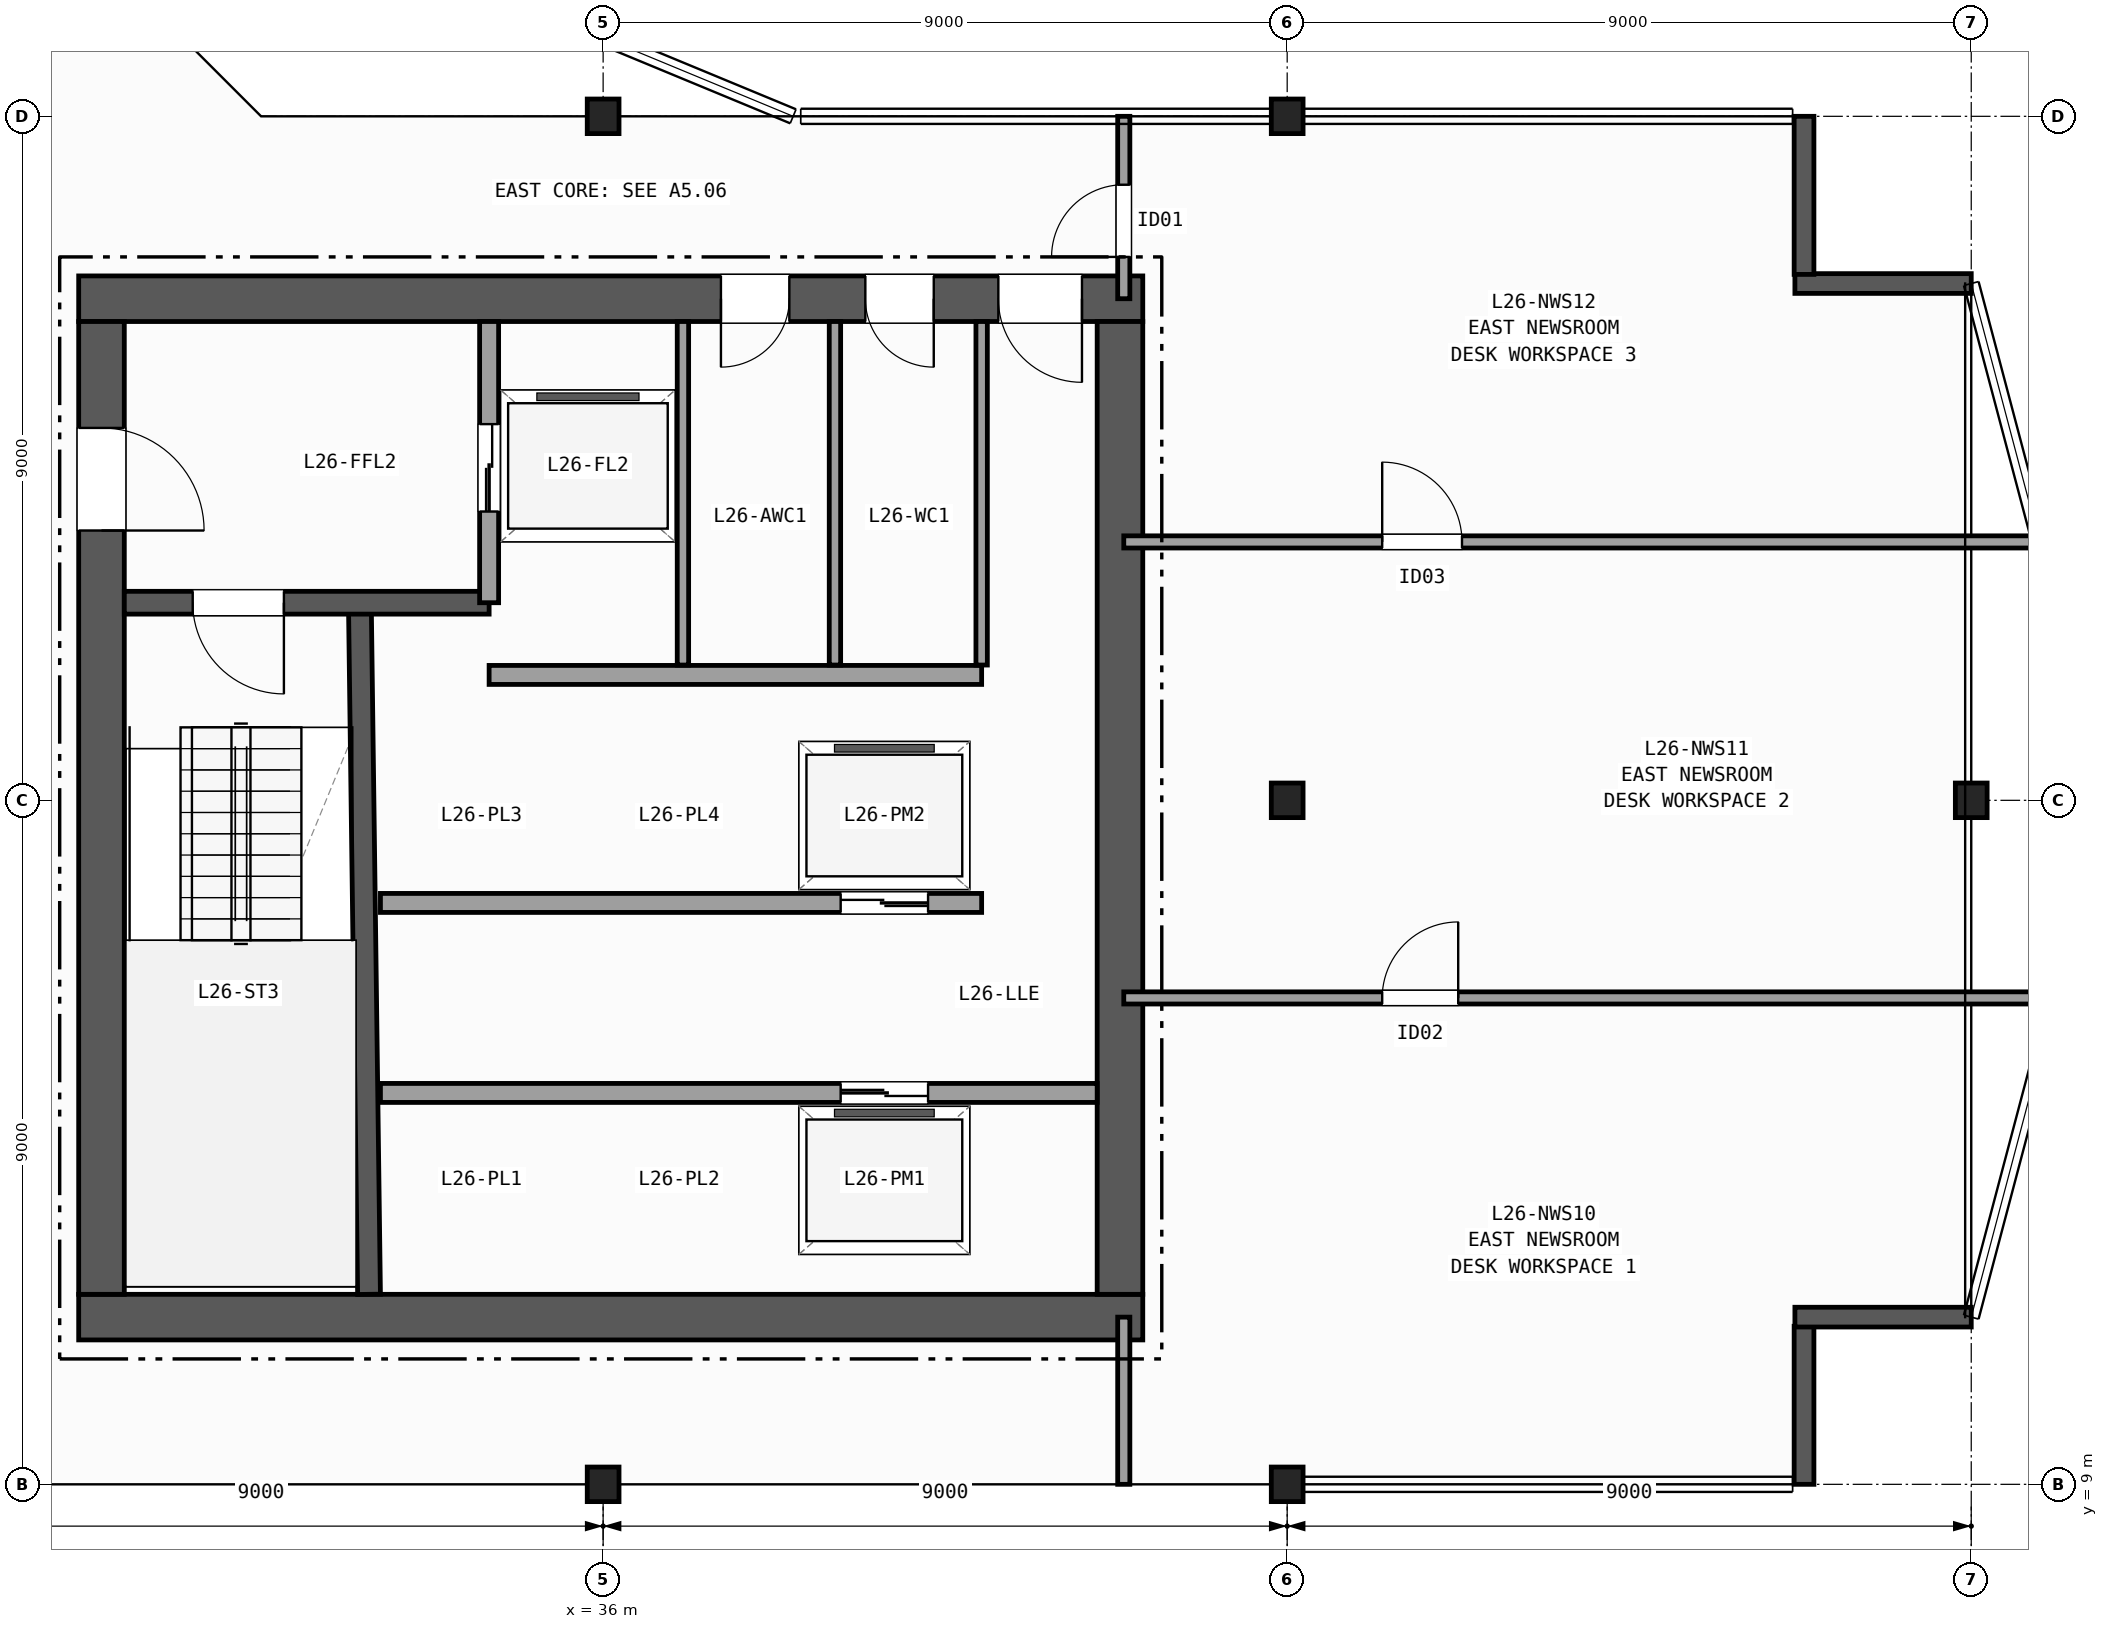
"""IFC4 building model, lengths in metres.
Left out: names, types, materials, properties, quantities, classifications, styles, units other than length and angle.
Written with IfcOpenShell. Run it as: python <this file> out.ifc"""

import sys

from ifc_helpers import new_model, si_unit, direction, frame, frame_2d, origin, origin_2d, place, context, subcontext, project, spatial, rectangle, i_section, extrude, element, fill, save


model = new_model("IFC4")
c1 = context("Model", 3, precision=1e-05, world=origin(), true_north=direction((0.0, 1.0)))
c2 = subcontext(c1, "Body", "Model", "MODEL_VIEW")
j1 = project(units=[si_unit("LENGTHUNIT", "METRE"), si_unit("PLANEANGLEUNIT", "RADIAN")], contexts=[c1])
p1 = place(None, origin())
s1 = spatial("IfcSite", under=j1, at=p1, CompositionType="ELEMENT")
p2 = place(p1, origin())
s2 = spatial("IfcBuilding", under=s1, at=p2, CompositionType="ELEMENT")
p3 = place(p2, frame((0.0, 0.0, 110.0)))
s3 = spatial("IfcBuildingStorey", under=s2, at=p3, CompositionType="ELEMENT", Elevation=110.0)
for number, where, z_axis, x_axis in (
    (1, (36.0, 9.0, 0.0), (0.0, 0.0, 1.0), (1.0, 0.0, 0.0)),
    (2, (36.0, 27.0, 0.0), (0.0, 0.0, 1.0), (1.0, 0.0, 0.0)),
    (3, (45.0, 9.0, 0.0), (0.0, 0.0, 1.0), (1.0, 0.0, 0.0)),
    (4, (45.0, 18.0, 0.0), (0.0, 0.0, 1.0), (1.0, 0.0, 0.0)),
    (5, (45.0, 27.0, 0.0), (0.0, 0.0, 1.0), (1.0, 0.0, 0.0)),
    (6, (54.0, 18.0, 0.0), (0.0, 0.0, 1.0), (1.0, 0.0, 0.0)),
):
    element("IfcColumn", number, at=place(p3, frame(where, z_axis=z_axis, x_axis=x_axis)), inside=s3, PredefinedType="COLUMN", context=c2, shape_type="SweptSolid", body=[
        extrude(i_section(OverallWidth=0.418, OverallDepth=0.455, WebThickness=0.042, FlangeThickness=0.068, FilletRadius=0.015, at=origin_2d()), origin(), (0.0, 0.0, 1.0), 3.7),
    ])
p4 = place(p3, frame((51.8, 9.0, 0.0), z_axis=(0.0, 0.0, 1.0), x_axis=(0.0, 1.0, 0.0)))
e7 = element("IfcWall", 7, at=p4, inside=s3, PredefinedType="SOLIDWALL", context=c2, shape_type="SweptSolid", body=[
    extrude(rectangle(XDim=2.08, YDim=0.26, at=frame_2d((1.04, 0.0))), origin(), (0.0, 0.0, 1.0), 3.42),
])
for number, where, z_axis, x_axis in (
    (8, (51.68, 11.2, 0.0), (0.0, 0.0, 1.0), (1.0, 0.0, 0.0)),
    (9, (54.0, 24.8, 0.0), (0.0, 0.0, 1.0), (-1.0, 0.0, 0.0)),
):
    element("IfcWall", number, at=place(p3, frame(where, z_axis=z_axis, x_axis=x_axis)), inside=s3, PredefinedType="SOLIDWALL", context=c2, shape_type="SweptSolid", body=[
        extrude(rectangle(XDim=2.32, YDim=0.26, at=frame_2d((1.16, 0.0))), origin(), (0.0, 0.0, 1.0), 3.42),
    ])
p5 = place(p3, frame((51.8, 24.92, 0.0), z_axis=(0.0, 0.0, 1.0), x_axis=(0.0, 1.0, 0.0)))
e10 = element("IfcWall", 10, at=p5, inside=s3, PredefinedType="SOLIDWALL", context=c2, shape_type="SweptSolid", body=[
    extrude(rectangle(XDim=2.08, YDim=0.26, at=frame_2d((1.04, 0.0))), origin(), (0.0, 0.0, 1.0), 3.42),
])
p6 = place(p3, frame((29.1, 11.2, 0.0), z_axis=(0.0, 0.0, 1.0), x_axis=(1.0, 0.0, 0.0)))
e11 = element("IfcWall", 11, at=p6, inside=s3, PredefinedType="SHEAR", context=c2, shape_type="SweptSolid", body=[
    extrude(rectangle(XDim=14.0, YDim=0.6, at=frame_2d((7.0, 0.0))), origin(), (0.0, 0.0, 1.0), 3.42),
])
p7 = place(p3, frame((43.1, 24.6, 0.0), z_axis=(0.0, 0.0, 1.0), x_axis=(-1.0, 0.0, 0.0)))
e12 = element("IfcWall", 12, at=p7, inside=s3, PredefinedType="SHEAR", context=c2, shape_type="SweptSolid", body=[
    extrude(rectangle(XDim=14.0, YDim=0.6, at=frame_2d((7.0, 0.0))), origin(), (0.0, 0.0, 1.0), 3.42),
])
p8 = place(p7, frame((0.8, 0.0, 0.0)))
e13 = element("IfcOpeningElement", 13, at=p8, cuts=e12, PredefinedType="OPENING", context=c2, shape_type="SweptSolid", body=[
    extrude(rectangle(XDim=1.1, YDim=2.15, at=frame_2d((0.55, 1.075))), frame((0.0, 0.31, 0.0), z_axis=(0.0, -1.0, 0.0), x_axis=(1.0, 0.0, 0.0)), (0.0, 0.0, 1.0), 0.62),
])
p9 = place(p7, frame((2.75, 0.0, 0.0)))
e14 = element("IfcOpeningElement", 14, at=p9, cuts=e12, PredefinedType="OPENING", context=c2, shape_type="SweptSolid", body=[
    extrude(rectangle(XDim=0.9, YDim=2.1, at=frame_2d((0.45, 1.05))), frame((0.0, 0.31, 0.0), z_axis=(0.0, -1.0, 0.0), x_axis=(1.0, 0.0, 0.0)), (0.0, 0.0, 1.0), 0.62),
])
p10 = place(p7, frame((4.65, 0.0, 0.0)))
e15 = element("IfcOpeningElement", 15, at=p10, cuts=e12, PredefinedType="OPENING", context=c2, shape_type="SweptSolid", body=[
    extrude(rectangle(XDim=0.9, YDim=2.1, at=frame_2d((0.45, 1.05))), frame((0.0, 0.31, 0.0), z_axis=(0.0, -1.0, 0.0), x_axis=(1.0, 0.0, 0.0)), (0.0, 0.0, 1.0), 0.62),
])
p11 = place(p3, frame((29.4, 24.3, 0.0), z_axis=(0.0, 0.0, 1.0), x_axis=(0.0, -1.0, 0.0)))
e16 = element("IfcWall", 16, at=p11, inside=s3, PredefinedType="SHEAR", context=c2, shape_type="SweptSolid", body=[
    extrude(rectangle(XDim=12.8, YDim=0.6, at=frame_2d((6.4, 0.0))), origin(), (0.0, 0.0, 1.0), 3.42),
])
p12 = place(p11, frame((1.4, 0.0, 0.0)))
e17 = element("IfcOpeningElement", 17, at=p12, cuts=e16, PredefinedType="OPENING", context=c2, shape_type="SweptSolid", body=[
    extrude(rectangle(XDim=1.35, YDim=2.15, at=frame_2d((0.675, 1.075))), frame((0.0, 0.31, 0.0), z_axis=(0.0, -1.0, 0.0), x_axis=(1.0, 0.0, 0.0)), (0.0, 0.0, 1.0), 0.62),
])
p13 = place(p3, frame((42.8, 11.5, 0.0), z_axis=(0.0, 0.0, 1.0), x_axis=(0.0, 1.0, 0.0)))
e18 = element("IfcWall", 18, at=p13, inside=s3, PredefinedType="SHEAR", context=c2, shape_type="SweptSolid", body=[
    extrude(rectangle(XDim=12.8, YDim=0.6, at=frame_2d((6.4, 0.0))), origin(), (0.0, 0.0, 1.0), 3.42),
])
p14 = place(p3, frame((32.92, 11.5, 0.0), z_axis=(0.0, 0.0, 1.0), x_axis=(-0.013244407292, 0.999912288991, 0.0)))
e19 = element("IfcWall", 19, at=p14, inside=s3, PredefinedType="SHEAR", context=c2, shape_type="SweptSolid", body=[
    extrude(rectangle(XDim=9.051, YDim=0.3, at=frame_2d((4.525, 0.0))), origin(), (0.0, 0.0, 1.0), 3.42),
])
p15 = place(p3, frame((34.5, 20.6, 0.0), z_axis=(0.0, 0.0, 1.0), x_axis=(-1.0, 0.0, 0.0)))
e20 = element("IfcWall", 20, at=p15, inside=s3, PredefinedType="SHEAR", context=c2, shape_type="SweptSolid", body=[
    extrude(rectangle(XDim=4.8, YDim=0.3, at=frame_2d((2.4, 0.0))), origin(), (0.0, 0.0, 1.0), 3.42),
])
p16 = place(p15, frame((2.7, 0.0, 0.0)))
e21 = element("IfcOpeningElement", 21, at=p16, cuts=e20, PredefinedType="OPENING", context=c2, shape_type="SweptSolid", body=[
    extrude(rectangle(XDim=1.2, YDim=2.15, at=frame_2d((0.6, 1.075))), frame((0.0, 0.16, 0.0), z_axis=(0.0, -1.0, 0.0), x_axis=(1.0, 0.0, 0.0)), (0.0, 0.0, 1.0), 0.32),
])
p17 = place(p3, frame((34.5, 20.6, 0.0), z_axis=(0.0, 0.0, 1.0), x_axis=(0.0, 1.0, 0.0)))
e22 = element("IfcWall", 22, at=p17, inside=s3, PredefinedType="PARTITIONING", context=c2, shape_type="SweptSolid", body=[
    extrude(rectangle(XDim=3.7, YDim=0.25, at=frame_2d((1.85, 0.0))), origin(), (0.0, 0.0, 1.0), 3.42),
])
p18 = place(p17, frame((1.2, 0.0, 0.0)))
e23 = element("IfcOpeningElement", 23, at=p18, cuts=e22, PredefinedType="OPENING", context=c2, shape_type="SweptSolid", body=[
    extrude(rectangle(XDim=1.15, YDim=2.15, at=frame_2d((0.575, 1.075))), frame((0.0, 0.135, 0.0), z_axis=(0.0, -1.0, 0.0), x_axis=(1.0, 0.0, 0.0)), (0.0, 0.0, 1.0), 0.27),
])
p19 = place(p3, frame((34.5, 19.65, 0.0), z_axis=(0.0, 0.0, 1.0), x_axis=(1.0, 0.0, 0.0)))
e24 = element("IfcWall", 24, at=p19, inside=s3, PredefinedType="PARTITIONING", context=c2, shape_type="SweptSolid", body=[
    extrude(rectangle(XDim=6.48, YDim=0.25, at=frame_2d((3.24, 0.0))), origin(), (0.0, 0.0, 1.0), 3.42),
])
p20 = place(p3, frame((33.07, 14.15, 0.0), z_axis=(0.0, 0.0, 1.0), x_axis=(1.0, 0.0, 0.0)))
e25 = element("IfcWall", 25, at=p20, inside=s3, PredefinedType="PARTITIONING", context=c2, shape_type="SweptSolid", body=[
    extrude(rectangle(XDim=9.43, YDim=0.25, at=frame_2d((4.715, 0.0))), origin(), (0.0, 0.0, 1.0), 3.42),
])
p21 = place(p20, frame((6.055, 0.0, 0.0)))
e26 = element("IfcOpeningElement", 26, at=p21, cuts=e25, PredefinedType="OPENING", context=c2, shape_type="SweptSolid", body=[
    extrude(rectangle(XDim=1.15, YDim=2.15, at=frame_2d((0.575, 1.075))), frame((0.0, 0.135, 0.0), z_axis=(0.0, -1.0, 0.0), x_axis=(1.0, 0.0, 0.0)), (0.0, 0.0, 1.0), 0.27),
])
p22 = place(p3, frame((40.98, 16.65, 0.0), z_axis=(0.0, 0.0, 1.0), x_axis=(-1.0, 0.0, 0.0)))
e27 = element("IfcWall", 27, at=p22, inside=s3, PredefinedType="PARTITIONING", context=c2, shape_type="SweptSolid", body=[
    extrude(rectangle(XDim=7.91, YDim=0.25, at=frame_2d((3.955, 0.0))), origin(), (0.0, 0.0, 1.0), 3.42),
])
p23 = place(p22, frame((0.705, 0.0, 0.0)))
e28 = element("IfcOpeningElement", 28, at=p23, cuts=e27, PredefinedType="OPENING", context=c2, shape_type="SweptSolid", body=[
    extrude(rectangle(XDim=1.15, YDim=2.15, at=frame_2d((0.575, 1.075))), frame((0.0, 0.135, 0.0), z_axis=(0.0, -1.0, 0.0), x_axis=(1.0, 0.0, 0.0)), (0.0, 0.0, 1.0), 0.27),
])
for number, where, z_axis, x_axis in (
    (29, (37.05, 19.78, 0.0), (0.0, 0.0, 1.0), (0.0, 1.0, 0.0)),
    (30, (39.05, 19.78, 0.0), (0.0, 0.0, 1.0), (0.0, 1.0, 0.0)),
    (31, (40.98, 19.78, 0.0), (0.0, 0.0, 1.0), (0.0, 1.0, 0.0)),
):
    element("IfcWall", number, at=place(p3, frame(where, z_axis=z_axis, x_axis=x_axis)), inside=s3, PredefinedType="PARTITIONING", context=c2, shape_type="SweptSolid", body=[
        extrude(rectangle(XDim=4.52, YDim=0.15, at=frame_2d((2.26, 0.0))), origin(), (0.0, 0.0, 1.0), 3.42),
    ])
p24 = place(p3, frame((42.85, 9.0, 0.0), z_axis=(0.0, 0.0, 1.0), x_axis=(0.0, 1.0, 0.0)))
e32 = element("IfcWall", 32, at=p24, inside=s3, PredefinedType="PARTITIONING", context=c2, shape_type="SweptSolid", body=[
    extrude(rectangle(XDim=2.2, YDim=0.16, at=frame_2d((1.1, 0.0))), origin(), (0.0, 0.0, 1.0), 2.634),
])
p25 = place(p3, frame((42.85, 24.6, 0.0), z_axis=(0.0, 0.0, 1.0), x_axis=(0.0, 1.0, 0.0)))
e33 = element("IfcWall", 33, at=p25, inside=s3, PredefinedType="PARTITIONING", context=c2, shape_type="SweptSolid", body=[
    extrude(rectangle(XDim=2.4, YDim=0.16, at=frame_2d((1.2, 0.0))), origin(), (0.0, 0.0, 1.0), 2.634),
])
p26 = place(p25, frame((0.55, 0.0, 0.0)))
e34 = element("IfcOpeningElement", 34, at=p26, cuts=e33, PredefinedType="OPENING", context=c2, shape_type="SweptSolid", body=[
    extrude(rectangle(XDim=0.95, YDim=2.1, at=frame_2d((0.475, 1.05))), frame((0.0, 0.09, 0.0), z_axis=(0.0, -1.0, 0.0), x_axis=(1.0, 0.0, 0.0)), (0.0, 0.0, 1.0), 0.18),
])
p27 = place(p3, frame((42.85, 15.4, 0.0), z_axis=(0.0, 0.0, 1.0), x_axis=(1.0, 0.0, 0.0)))
e35 = element("IfcWall", 35, at=p27, inside=s3, PredefinedType="PARTITIONING", context=c2, shape_type="SweptSolid", body=[
    extrude(rectangle(XDim=12.262, YDim=0.16, at=frame_2d((6.131, 0.0))), origin(), (0.0, 0.0, 1.0), 3.42),
])
p28 = place(p27, frame((3.4, 0.0, 0.0)))
e36 = element("IfcOpeningElement", 36, at=p28, cuts=e35, PredefinedType="OPENING", context=c2, shape_type="SweptSolid", body=[
    extrude(rectangle(XDim=1.0, YDim=2.1, at=frame_2d((0.5, 1.05))), frame((0.0, 0.09, 0.0), z_axis=(0.0, -1.0, 0.0), x_axis=(1.0, 0.0, 0.0)), (0.0, 0.0, 1.0), 0.18),
])
p29 = place(p3, frame((42.85, 21.4, 0.0), z_axis=(0.0, 0.0, 1.0), x_axis=(1.0, 0.0, 0.0)))
e37 = element("IfcWall", 37, at=p29, inside=s3, PredefinedType="PARTITIONING", context=c2, shape_type="SweptSolid", body=[
    extrude(rectangle(XDim=12.05, YDim=0.16, at=frame_2d((6.025, 0.0))), origin(), (0.0, 0.0, 1.0), 3.42),
])
p30 = place(p29, frame((3.4, 0.0, 0.0)))
e38 = element("IfcOpeningElement", 38, at=p30, cuts=e37, PredefinedType="OPENING", context=c2, shape_type="SweptSolid", body=[
    extrude(rectangle(XDim=1.05, YDim=2.15, at=frame_2d((0.525, 1.075))), frame((0.0, 0.09, 0.0), z_axis=(0.0, -1.0, 0.0), x_axis=(1.0, 0.0, 0.0)), (0.0, 0.0, 1.0), 0.18),
])
p31 = place(p16, origin())
e39 = element("IfcDoor", 39, at=p31, inside=s3, OperationType="SINGLE_SWING_LEFT", PredefinedType="DOOR", context=c2, shape_type="SweptSolid", body=[
    extrude(rectangle(XDim=1.2, YDim=2.15, at=frame_2d((0.6, 1.075))), frame((0.0, 0.025, 0.0), z_axis=(0.0, -1.0, 0.0), x_axis=(1.0, 0.0, 0.0)), (0.0, 0.0, 1.0), 0.05),
])
fill(e21, e39)
p32 = place(p12, origin())
e40 = element("IfcDoor", 40, at=p32, inside=s3, OperationType="SINGLE_SWING_RIGHT", PredefinedType="DOOR", context=c2, shape_type="SweptSolid", body=[
    extrude(rectangle(XDim=1.35, YDim=2.15, at=frame_2d((0.675, 1.075))), frame((0.0, 0.025, 0.0), z_axis=(0.0, -1.0, 0.0), x_axis=(1.0, 0.0, 0.0)), (0.0, 0.0, 1.0), 0.05),
])
fill(e17, e40)
p33 = place(p8, origin())
e41 = element("IfcDoor", 41, at=p33, inside=s3, OperationType="SINGLE_SWING_LEFT", PredefinedType="DOOR", context=c2, shape_type="SweptSolid", body=[
    extrude(rectangle(XDim=1.1, YDim=2.15, at=frame_2d((0.55, 1.075))), frame((0.0, 0.025, 0.0), z_axis=(0.0, -1.0, 0.0), x_axis=(1.0, 0.0, 0.0)), (0.0, 0.0, 1.0), 0.05),
])
fill(e13, e41)
p34 = place(p9, origin())
e42 = element("IfcDoor", 42, at=p34, inside=s3, OperationType="SINGLE_SWING_LEFT", PredefinedType="DOOR", context=c2, shape_type="SweptSolid", body=[
    extrude(rectangle(XDim=0.9, YDim=2.1, at=frame_2d((0.45, 1.05))), frame((0.0, 0.025, 0.0), z_axis=(0.0, -1.0, 0.0), x_axis=(1.0, 0.0, 0.0)), (0.0, 0.0, 1.0), 0.05),
])
fill(e14, e42)
p35 = place(p10, origin())
e43 = element("IfcDoor", 43, at=p35, inside=s3, OperationType="SINGLE_SWING_RIGHT", PredefinedType="DOOR", context=c2, shape_type="SweptSolid", body=[
    extrude(rectangle(XDim=0.9, YDim=2.1, at=frame_2d((0.45, 1.05))), frame((0.0, 0.025, 0.0), z_axis=(0.0, -1.0, 0.0), x_axis=(1.0, 0.0, 0.0)), (0.0, 0.0, 1.0), 0.05),
])
fill(e15, e43)
p36 = place(p18, origin())
e44 = element("IfcDoor", 44, at=p36, inside=s3, OperationType="DOUBLE_DOOR_SLIDING", PredefinedType="DOOR", context=c2, shape_type="SweptSolid", body=[
    extrude(rectangle(XDim=1.15, YDim=2.15, at=frame_2d((0.575, 1.075))), frame((0.0, 0.025, 0.0), z_axis=(0.0, -1.0, 0.0), x_axis=(1.0, 0.0, 0.0)), (0.0, 0.0, 1.0), 0.05),
])
fill(e23, e44)
p37 = place(p21, origin())
e45 = element("IfcDoor", 45, at=p37, inside=s3, OperationType="DOUBLE_DOOR_SLIDING", PredefinedType="DOOR", context=c2, shape_type="SweptSolid", body=[
    extrude(rectangle(XDim=1.15, YDim=2.15, at=frame_2d((0.575, 1.075))), frame((0.0, 0.025, 0.0), z_axis=(0.0, -1.0, 0.0), x_axis=(1.0, 0.0, 0.0)), (0.0, 0.0, 1.0), 0.05),
])
fill(e26, e45)
p38 = place(p23, origin())
e46 = element("IfcDoor", 46, at=p38, inside=s3, OperationType="DOUBLE_DOOR_SLIDING", PredefinedType="DOOR", context=c2, shape_type="SweptSolid", body=[
    extrude(rectangle(XDim=1.15, YDim=2.15, at=frame_2d((0.575, 1.075))), frame((0.0, 0.025, 0.0), z_axis=(0.0, -1.0, 0.0), x_axis=(1.0, 0.0, 0.0)), (0.0, 0.0, 1.0), 0.05),
])
fill(e28, e46)
p39 = place(p26, origin())
e47 = element("IfcDoor", 47, at=p39, inside=s3, OperationType="SINGLE_SWING_LEFT", PredefinedType="DOOR", context=c2, shape_type="SweptSolid", body=[
    extrude(rectangle(XDim=0.95, YDim=2.1, at=frame_2d((0.475, 1.05))), frame((0.0, 0.025, 0.0), z_axis=(0.0, -1.0, 0.0), x_axis=(1.0, 0.0, 0.0)), (0.0, 0.0, 1.0), 0.05),
])
fill(e34, e47)
p40 = place(p28, origin())
e48 = element("IfcDoor", 48, at=p40, inside=s3, OperationType="SINGLE_SWING_RIGHT", PredefinedType="DOOR", context=c2, shape_type="SweptSolid", body=[
    extrude(rectangle(XDim=1.0, YDim=2.1, at=frame_2d((0.5, 1.05))), frame((0.0, 0.025, 0.0), z_axis=(0.0, -1.0, 0.0), x_axis=(1.0, 0.0, 0.0)), (0.0, 0.0, 1.0), 0.05),
])
fill(e36, e48)
p41 = place(p30, origin())
e49 = element("IfcDoor", 49, at=p41, inside=s3, OperationType="SINGLE_SWING_LEFT", PredefinedType="DOOR", context=c2, shape_type="SweptSolid", body=[
    extrude(rectangle(XDim=1.05, YDim=2.15, at=frame_2d((0.525, 1.075))), frame((0.0, 0.025, 0.0), z_axis=(0.0, -1.0, 0.0), x_axis=(1.0, 0.0, 0.0)), (0.0, 0.0, 1.0), 0.05),
])
fill(e38, e49)
save(model, sys.argv[1])
